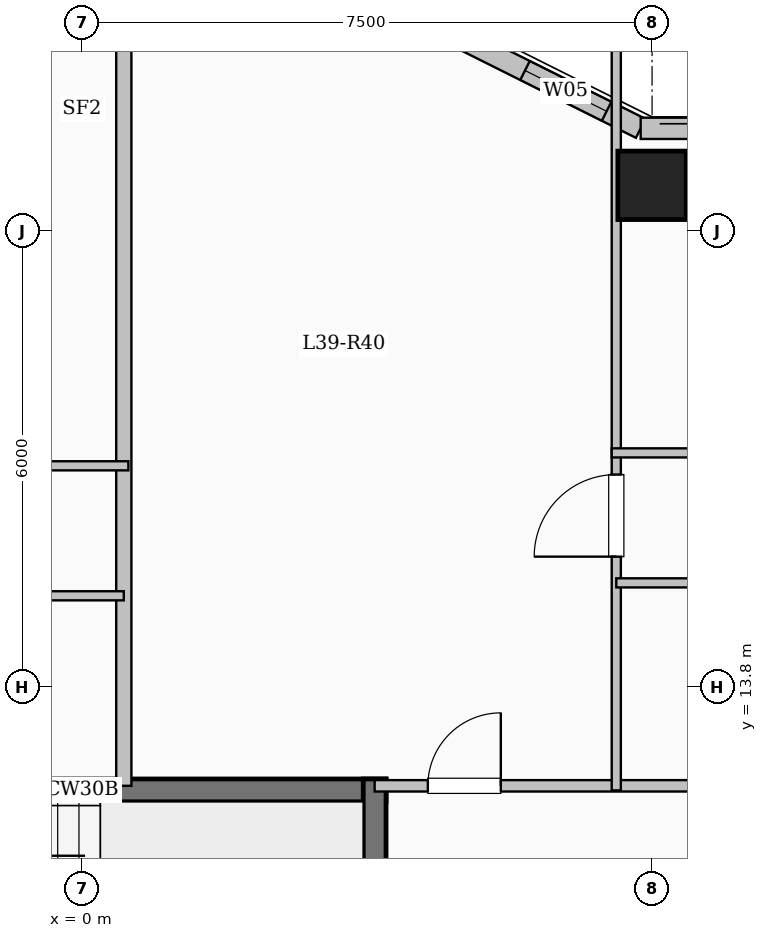
"""IFC4 building model, lengths in metres.
Left out: names, types, materials, properties, quantities, classifications, styles, units other than length and angle.
Written with IfcOpenShell. Run it as: python <this file> out.ifc"""

import sys

from ifc_helpers import new_model, si_unit, direction, frame, frame_2d, origin, origin_2d, place, context, subcontext, project, spatial, rectangle, extrude, element, fill, save


model = new_model("IFC4")
c1 = context("Model", 3, precision=1e-05, world=origin(), true_north=direction((0.0, 1.0)))
c2 = subcontext(c1, "Body", "Model", "MODEL_VIEW")
j1 = project(units=[si_unit("LENGTHUNIT", "METRE"), si_unit("PLANEANGLEUNIT", "RADIAN")], contexts=[c1])
p1 = place(None, origin())
s1 = spatial("IfcSite", under=j1, at=p1, CompositionType="ELEMENT")
p2 = place(p1, origin())
s2 = spatial("IfcBuilding", under=s1, at=p2, CompositionType="ELEMENT")
p3 = place(p2, frame((0.0, 0.0, 146.0)))
s3 = spatial("IfcBuildingStorey", under=s2, at=p3, CompositionType="ELEMENT", Elevation=146.0)
p4 = place(p3, frame((7.5, 20.4, 0.0), z_axis=(0.0, 0.0, 1.0), x_axis=(1.0, 0.0, 0.0)))
e1 = element("IfcColumn", 1, at=p4, inside=s3, PredefinedType="COLUMN", context=c2, shape_type="SweptSolid", body=[
    extrude(rectangle(XDim=0.9, YDim=0.9, at=origin_2d()), origin(), (0.0, 0.0, 1.0), 3.35),
])
p5 = place(p3, frame((4.35, 22.65, 0.0), z_axis=(0.0, 0.0, 1.0), x_axis=(0.894427191, -0.4472135955, 0.0)))
e2 = element("IfcWall", 2, at=p5, inside=s3, PredefinedType="SOLIDWALL", context=c2, shape_type="SweptSolid", body=[
    extrude(rectangle(XDim=3.354, YDim=0.28, at=frame_2d((1.677, 0.0))), origin(), (0.0, 0.0, 1.0), 3.1),
])
p6 = place(p5, frame((1.653, 0.0, 0.95)))
e3 = element("IfcOpeningElement", 3, at=p6, cuts=e2, PredefinedType="OPENING", context=c2, shape_type="SweptSolid", body=[
    extrude(rectangle(XDim=1.2, YDim=1.5, at=frame_2d((0.6, 0.75))), frame((0.0, 0.15, 0.0), z_axis=(0.0, -1.0, 0.0), x_axis=(1.0, 0.0, 0.0)), (0.0, 0.0, 1.0), 0.3),
])
p7 = place(p3, frame((7.35, 21.15, 0.0), z_axis=(0.0, 0.0, 1.0), x_axis=(1.0, 0.0, 0.0)))
e4 = element("IfcWall", 4, at=p7, inside=s3, PredefinedType="SOLIDWALL", context=c2, shape_type="SweptSolid", body=[
    extrude(rectangle(XDim=12.3, YDim=0.28, at=frame_2d((6.15, 0.0))), origin(), (0.0, 0.0, 1.0), 3.1),
])
p8 = place(p7, frame((1.033, 0.0, 0.9)))
e5 = element("IfcOpeningElement", 5, at=p8, cuts=e4, PredefinedType="OPENING", context=c2, shape_type="SweptSolid", body=[
    extrude(rectangle(XDim=1.65, YDim=1.6, at=frame_2d((0.825, 0.8))), frame((0.0, 0.15, 0.0), z_axis=(0.0, -1.0, 0.0), x_axis=(1.0, 0.0, 0.0)), (0.0, 0.0, 1.0), 0.3),
])
p9 = place(p7, frame((5.099, 0.0, 0.9)))
e6 = element("IfcOpeningElement", 6, at=p9, cuts=e4, PredefinedType="OPENING", context=c2, shape_type="SweptSolid", body=[
    extrude(rectangle(XDim=1.65, YDim=1.6, at=frame_2d((0.825, 0.8))), frame((0.0, 0.15, 0.0), z_axis=(0.0, -1.0, 0.0), x_axis=(1.0, 0.0, 0.0)), (0.0, 0.0, 1.0), 0.3),
])
p10 = place(p7, frame((9.291, 0.0, 0.9)))
e7 = element("IfcOpeningElement", 7, at=p10, cuts=e4, PredefinedType="OPENING", context=c2, shape_type="SweptSolid", body=[
    extrude(rectangle(XDim=1.65, YDim=1.6, at=frame_2d((0.825, 0.8))), frame((0.0, 0.15, 0.0), z_axis=(0.0, -1.0, 0.0), x_axis=(1.0, 0.0, 0.0)), (0.0, 0.0, 1.0), 0.3),
])
p11 = place(p3, frame((-4.0, 12.44, 0.0), z_axis=(0.0, 0.0, 1.0), x_axis=(1.0, 0.0, 0.0)))
e8 = element("IfcWall", 8, at=p11, inside=s3, PredefinedType="SHEAR", context=c2, shape_type="SweptSolid", body=[
    extrude(rectangle(XDim=8.0, YDim=0.3, at=frame_2d((4.0, 0.0))), origin(), (0.0, 0.0, 1.0), 3.35),
])
p12 = place(p3, frame((3.85, 9.0, 0.0), z_axis=(0.0, 0.0, 1.0), x_axis=(0.0, 1.0, 0.0)))
e9 = element("IfcWall", 9, at=p12, inside=s3, PredefinedType="SHEAR", context=c2, shape_type="SweptSolid", body=[
    extrude(rectangle(XDim=3.59, YDim=0.3, at=frame_2d((1.795, 0.0))), origin(), (0.0, 0.0, 1.0), 3.35),
])
p13 = place(p3, frame((3.85, 12.5, 0.0), z_axis=(0.0, 0.0, 1.0), x_axis=(1.0, 0.0, 0.0)))
e10 = element("IfcWall", 10, at=p13, inside=s3, PredefinedType="PARTITIONING", context=c2, shape_type="SweptSolid", body=[
    extrude(rectangle(XDim=15.7, YDim=0.15, at=frame_2d((7.85, 0.0))), origin(), (0.0, 0.0, 1.0), 3.1),
])
p14 = place(p13, frame((0.7, 0.0, 0.0)))
e11 = element("IfcOpeningElement", 11, at=p14, cuts=e10, PredefinedType="OPENING", context=c2, shape_type="SweptSolid", body=[
    extrude(rectangle(XDim=0.96, YDim=2.15, at=frame_2d((0.48, 1.075))), frame((0.0, 0.085, 0.0), z_axis=(0.0, -1.0, 0.0), x_axis=(1.0, 0.0, 0.0)), (0.0, 0.0, 1.0), 0.17),
])
p15 = place(p3, frame((0.55, 12.5, 0.0), z_axis=(0.0, 0.0, 1.0), x_axis=(0.0, 1.0, 0.0)))
e12 = element("IfcWall", 12, at=p15, inside=s3, PredefinedType="SOLIDWALL", context=c2, shape_type="SweptSolid", body=[
    extrude(rectangle(XDim=10.18, YDim=0.2, at=frame_2d((5.09, 0.0))), origin(), (0.0, 0.0, 1.0), 3.1),
])
p16 = place(p3, frame((-5.708, 15.0, 0.0), z_axis=(0.0, 0.0, 1.0), x_axis=(1.0, 0.0, 0.0)))
e13 = element("IfcWall", 13, at=p16, inside=s3, PredefinedType="PARTITIONING", context=c2, shape_type="SweptSolid", body=[
    extrude(rectangle(XDim=6.258, YDim=0.12, at=frame_2d((3.129, 0.0))), origin(), (0.0, 0.0, 1.0), 3.1),
])
p17 = place(p16, frame((2.689, 0.0, 0.0)))
e14 = element("IfcOpeningElement", 14, at=p17, cuts=e13, PredefinedType="OPENING", context=c2, shape_type="SweptSolid", body=[
    extrude(rectangle(XDim=0.88, YDim=2.1, at=frame_2d((0.44, 1.05))), frame((0.0, 0.07, 0.0), z_axis=(0.0, -1.0, 0.0), x_axis=(1.0, 0.0, 0.0)), (0.0, 0.0, 1.0), 0.14),
])
p18 = place(p3, frame((-12.757, 16.71, 0.0), z_axis=(0.0, 0.0, 1.0), x_axis=(1.0, 0.0, 0.0)))
e15 = element("IfcWall", 15, at=p18, inside=s3, PredefinedType="PARTITIONING", context=c2, shape_type="SweptSolid", body=[
    extrude(rectangle(XDim=13.367, YDim=0.12, at=frame_2d((6.684, 0.0))), origin(), (0.0, 0.0, 1.0), 3.1),
])
p19 = place(p18, frame((1.758, 0.0, 0.0)))
e16 = element("IfcOpeningElement", 16, at=p19, cuts=e15, PredefinedType="OPENING", context=c2, shape_type="SweptSolid", body=[
    extrude(rectangle(XDim=0.88, YDim=2.1, at=frame_2d((0.44, 1.05))), frame((0.0, 0.07, 0.0), z_axis=(0.0, -1.0, 0.0), x_axis=(1.0, 0.0, 0.0)), (0.0, 0.0, 1.0), 0.14),
])
p20 = place(p18, frame((6.153, 0.0, 0.0)))
e17 = element("IfcOpeningElement", 17, at=p20, cuts=e15, PredefinedType="OPENING", context=c2, shape_type="SweptSolid", body=[
    extrude(rectangle(XDim=0.88, YDim=2.1, at=frame_2d((0.44, 1.05))), frame((0.0, 0.07, 0.0), z_axis=(0.0, -1.0, 0.0), x_axis=(1.0, 0.0, 0.0)), (0.0, 0.0, 1.0), 0.14),
])
p21 = place(p18, frame((10.549, 0.0, 0.0)))
e18 = element("IfcOpeningElement", 18, at=p21, cuts=e15, PredefinedType="OPENING", context=c2, shape_type="SweptSolid", body=[
    extrude(rectangle(XDim=0.88, YDim=2.1, at=frame_2d((0.44, 1.05))), frame((0.0, 0.07, 0.0), z_axis=(0.0, -1.0, 0.0), x_axis=(1.0, 0.0, 0.0)), (0.0, 0.0, 1.0), 0.14),
])
p22 = place(p3, frame((7.029, 12.44, 0.0), z_axis=(0.0, 0.0, 1.0), x_axis=(0.0, 1.0, 0.0)))
e19 = element("IfcWall", 19, at=p22, inside=s3, PredefinedType="PARTITIONING", context=c2, shape_type="SweptSolid", body=[
    extrude(rectangle(XDim=9.74, YDim=0.12, at=frame_2d((4.87, 0.0))), origin(), (0.0, 0.0, 1.0), 3.1),
])
p23 = place(p22, frame((3.075, 0.0, 0.0)))
e20 = element("IfcOpeningElement", 20, at=p23, cuts=e19, PredefinedType="OPENING", context=c2, shape_type="SweptSolid", body=[
    extrude(rectangle(XDim=1.08, YDim=2.15, at=frame_2d((0.54, 1.075))), frame((0.0, 0.07, 0.0), z_axis=(0.0, -1.0, 0.0), x_axis=(1.0, 0.0, 0.0)), (0.0, 0.0, 1.0), 0.14),
])
p24 = place(p3, frame((7.029, 15.17, 0.0), z_axis=(0.0, 0.0, 1.0), x_axis=(1.0, 0.0, 0.0)))
e21 = element("IfcWall", 21, at=p24, inside=s3, PredefinedType="PARTITIONING", context=c2, shape_type="SweptSolid", body=[
    extrude(rectangle(XDim=7.103, YDim=0.12, at=frame_2d((3.552, 0.0))), origin(), (0.0, 0.0, 1.0), 3.1),
])
p25 = place(p24, frame((3.111, 0.0, 0.0)))
e22 = element("IfcOpeningElement", 22, at=p25, cuts=e21, PredefinedType="OPENING", context=c2, shape_type="SweptSolid", body=[
    extrude(rectangle(XDim=0.88, YDim=2.1, at=frame_2d((0.44, 1.05))), frame((0.0, 0.07, 0.0), z_axis=(0.0, -1.0, 0.0), x_axis=(1.0, 0.0, 0.0)), (0.0, 0.0, 1.0), 0.14),
])
p26 = place(p3, frame((6.969, 16.88, 0.0), z_axis=(0.0, 0.0, 1.0), x_axis=(1.0, 0.0, 0.0)))
e23 = element("IfcWall", 23, at=p26, inside=s3, PredefinedType="PARTITIONING", context=c2, shape_type="SweptSolid", body=[
    extrude(rectangle(XDim=12.641, YDim=0.12, at=frame_2d((6.321, 0.0))), origin(), (0.0, 0.0, 1.0), 2.685),
])
p27 = place(p26, frame((1.637, 0.0, 0.0)))
e24 = element("IfcOpeningElement", 24, at=p27, cuts=e23, PredefinedType="OPENING", context=c2, shape_type="SweptSolid", body=[
    extrude(rectangle(XDim=0.88, YDim=2.1, at=frame_2d((0.44, 1.05))), frame((0.0, 0.07, 0.0), z_axis=(0.0, -1.0, 0.0), x_axis=(1.0, 0.0, 0.0)), (0.0, 0.0, 1.0), 0.14),
])
p28 = place(p26, frame((5.791, 0.0, 0.0)))
e25 = element("IfcOpeningElement", 25, at=p28, cuts=e23, PredefinedType="OPENING", context=c2, shape_type="SweptSolid", body=[
    extrude(rectangle(XDim=0.88, YDim=2.1, at=frame_2d((0.44, 1.05))), frame((0.0, 0.07, 0.0), z_axis=(0.0, -1.0, 0.0), x_axis=(1.0, 0.0, 0.0)), (0.0, 0.0, 1.0), 0.14),
])
p29 = place(p26, frame((9.944, 0.0, 0.0)))
e26 = element("IfcOpeningElement", 26, at=p29, cuts=e23, PredefinedType="OPENING", context=c2, shape_type="SweptSolid", body=[
    extrude(rectangle(XDim=0.88, YDim=2.1, at=frame_2d((0.44, 1.05))), frame((0.0, 0.07, 0.0), z_axis=(0.0, -1.0, 0.0), x_axis=(1.0, 0.0, 0.0)), (0.0, 0.0, 1.0), 0.14),
])
p30 = place(p6, origin())
e27 = element("IfcWindow", 27, at=p30, inside=s3, PartitioningType="SINGLE_PANEL", PredefinedType="WINDOW", context=c2, shape_type="SweptSolid", body=[
    extrude(rectangle(XDim=1.2, YDim=1.5, at=frame_2d((0.6, 0.75))), frame((0.0, 0.03, 0.0), z_axis=(0.0, -1.0, 0.0), x_axis=(1.0, 0.0, 0.0)), (0.0, 0.0, 1.0), 0.06),
])
fill(e3, e27)
p31 = place(p14, origin())
e28 = element("IfcDoor", 28, at=p31, inside=s3, OperationType="SINGLE_SWING_RIGHT", PredefinedType="DOOR", context=c2, shape_type="SweptSolid", body=[
    extrude(rectangle(XDim=0.96, YDim=2.15, at=frame_2d((0.48, 1.075))), frame((0.0, 0.025, 0.0), z_axis=(0.0, -1.0, 0.0), x_axis=(1.0, 0.0, 0.0)), (0.0, 0.0, 1.0), 0.05),
])
fill(e11, e28)
p32 = place(p23, origin())
e29 = element("IfcDoor", 29, at=p32, inside=s3, OperationType="SINGLE_SWING_LEFT", PredefinedType="DOOR", context=c2, shape_type="SweptSolid", body=[
    extrude(rectangle(XDim=1.08, YDim=2.15, at=frame_2d((0.54, 1.075))), frame((0.0, 0.025, 0.0), z_axis=(0.0, -1.0, 0.0), x_axis=(1.0, 0.0, 0.0)), (0.0, 0.0, 1.0), 0.05),
])
fill(e20, e29)
save(model, sys.argv[1])
